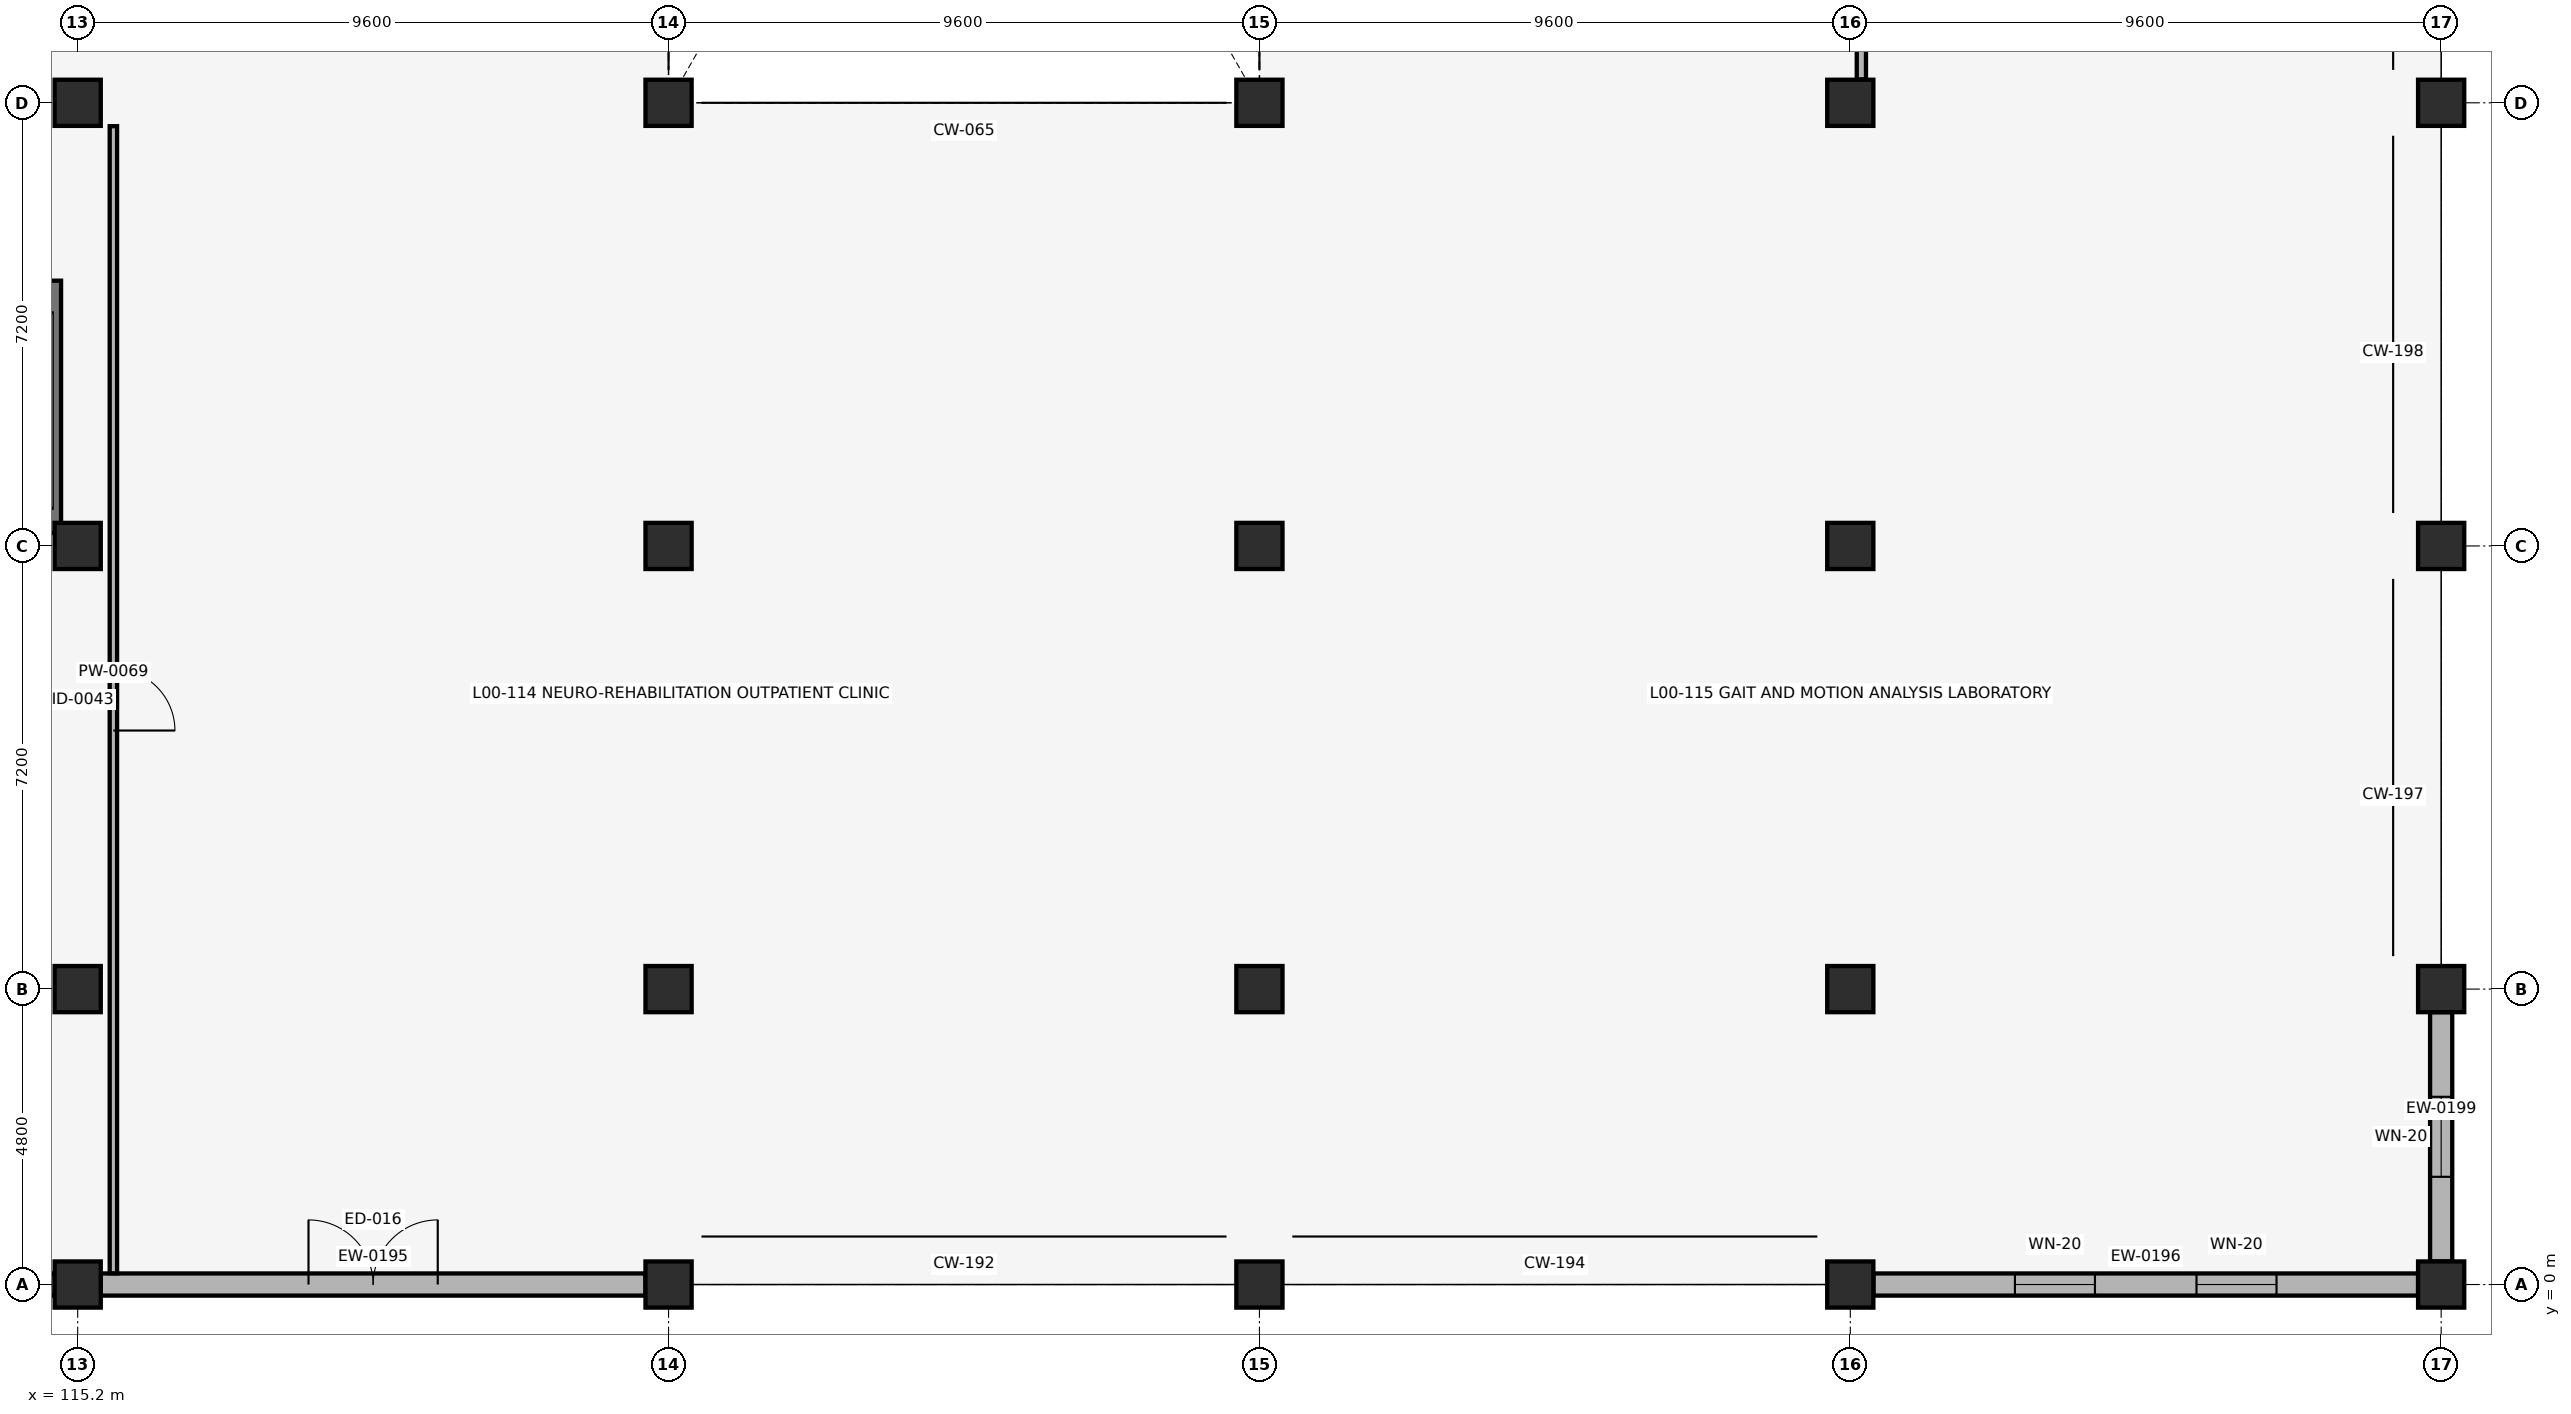
"""IFC4 building model, lengths in metres.
Left out: names, types, materials, properties, quantities, classifications, styles, units other than length and angle.
Written with IfcOpenShell. Run it as: python <this file> out.ifc"""

import sys

from ifc_helpers import new_model, si_unit, direction, frame, frame_2d, origin, origin_2d, place, context, subcontext, project, spatial, rectangle, circle, extrude, element, fill, save


model = new_model("IFC4")
c1 = context("Model", 3, precision=1e-05, world=origin(), true_north=direction((0.0, 1.0)))
c2 = subcontext(c1, "Body", "Model", "MODEL_VIEW")
j1 = project(units=[si_unit("LENGTHUNIT", "METRE"), si_unit("PLANEANGLEUNIT", "RADIAN")], contexts=[c1])
p1 = place(None, origin())
s1 = spatial("IfcSite", under=j1, at=p1, CompositionType="ELEMENT")
p2 = place(p1, origin())
s2 = spatial("IfcBuilding", under=s1, at=p2, CompositionType="ELEMENT")
p3 = place(p2, origin())
s3 = spatial("IfcBuildingStorey", under=s2, at=p3, CompositionType="ELEMENT", Elevation=0.0)
for number, where, z_axis, x_axis in (
    (1, (115.2, 0.0, -0.44), (0.0, 0.0, 1.0), (1.0, 0.0, 0.0)),
    (2, (115.2, 4.8, -0.44), (0.0, 0.0, 1.0), (1.0, 0.0, 0.0)),
    (3, (115.2, 12.0, -0.44), (0.0, 0.0, 1.0), (1.0, 0.0, 0.0)),
    (4, (115.2, 19.2, -0.44), (0.0, 0.0, 1.0), (1.0, 0.0, 0.0)),
    (5, (124.8, 0.0, -0.44), (0.0, 0.0, 1.0), (1.0, 0.0, 0.0)),
    (6, (124.8, 4.8, -0.44), (0.0, 0.0, 1.0), (1.0, 0.0, 0.0)),
    (7, (124.8, 12.0, -0.44), (0.0, 0.0, 1.0), (1.0, 0.0, 0.0)),
    (8, (124.8, 19.2, -0.44), (0.0, 0.0, 1.0), (1.0, 0.0, 0.0)),
    (9, (134.4, 0.0, -0.44), (0.0, 0.0, 1.0), (1.0, 0.0, 0.0)),
    (10, (134.4, 4.8, -0.44), (0.0, 0.0, 1.0), (1.0, 0.0, 0.0)),
    (11, (134.4, 12.0, -0.44), (0.0, 0.0, 1.0), (1.0, 0.0, 0.0)),
    (12, (134.4, 19.2, -0.44), (0.0, 0.0, 1.0), (1.0, 0.0, 0.0)),
    (13, (144.0, 0.0, -0.44), (0.0, 0.0, 1.0), (1.0, 0.0, 0.0)),
    (14, (144.0, 4.8, -0.44), (0.0, 0.0, 1.0), (1.0, 0.0, 0.0)),
    (15, (144.0, 12.0, -0.44), (0.0, 0.0, 1.0), (1.0, 0.0, 0.0)),
    (16, (144.0, 19.2, -0.44), (0.0, 0.0, 1.0), (1.0, 0.0, 0.0)),
    (17, (153.6, 0.0, -0.44), (0.0, 0.0, 1.0), (1.0, 0.0, 0.0)),
    (18, (153.6, 4.8, -0.44), (0.0, 0.0, 1.0), (1.0, 0.0, 0.0)),
    (19, (153.6, 12.0, -0.44), (0.0, 0.0, 1.0), (1.0, 0.0, 0.0)),
    (20, (153.6, 19.2, -0.44), (0.0, 0.0, 1.0), (1.0, 0.0, 0.0)),
):
    element("IfcColumn", number, at=place(p3, frame(where, z_axis=z_axis, x_axis=x_axis)), inside=s3, PredefinedType="COLUMN", context=c2, shape_type="SweptSolid", body=[
        extrude(circle(Radius=0.375, at=origin_2d()), origin(), (0.0, 0.0, 1.0), 4.86),
    ])
p4 = place(p3, frame((105.975, 0.0, 0.0), z_axis=(0.0, 0.0, 1.0), x_axis=(1.0, 0.0, 0.0)))
e21 = element("IfcWall", 21, at=p4, inside=s3, PredefinedType="SOLIDWALL", context=c2, shape_type="SweptSolid", body=[
    extrude(rectangle(XDim=8.85, YDim=0.36, at=frame_2d((4.425, 0.0))), origin(), (0.0, 0.0, 1.0), 3.4),
])
p5 = place(p4, frame((2.3, 0.0, 0.72)))
e22 = element("IfcOpeningElement", 22, at=p5, cuts=e21, PredefinedType="OPENING", context=c2, shape_type="SweptSolid", body=[
    extrude(rectangle(XDim=1.3, YDim=2.32, at=frame_2d((0.65, 1.16))), frame((0.0, 0.19, 0.0), z_axis=(0.0, -1.0, 0.0), x_axis=(1.0, 0.0, 0.0)), (0.0, 0.0, 1.0), 0.38),
])
p6 = place(p4, frame((5.25, 0.0, 0.72)))
e23 = element("IfcOpeningElement", 23, at=p6, cuts=e21, PredefinedType="OPENING", context=c2, shape_type="SweptSolid", body=[
    extrude(rectangle(XDim=1.3, YDim=2.32, at=frame_2d((0.65, 1.16))), frame((0.0, 0.19, 0.0), z_axis=(0.0, -1.0, 0.0), x_axis=(1.0, 0.0, 0.0)), (0.0, 0.0, 1.0), 0.38),
])
p7 = place(p3, frame((115.575, 0.0, 0.0), z_axis=(0.0, 0.0, 1.0), x_axis=(1.0, 0.0, 0.0)))
e24 = element("IfcWall", 24, at=p7, inside=s3, PredefinedType="SOLIDWALL", context=c2, shape_type="SweptSolid", body=[
    extrude(rectangle(XDim=8.85, YDim=0.36, at=frame_2d((4.425, 0.0))), origin(), (0.0, 0.0, 1.0), 3.4),
])
p8 = place(p7, frame((3.375, 0.0, 0.0)))
e25 = element("IfcOpeningElement", 25, at=p8, cuts=e24, PredefinedType="OPENING", context=c2, shape_type="SweptSolid", body=[
    extrude(rectangle(XDim=2.1, YDim=2.3, at=frame_2d((1.05, 1.15))), frame((0.0, 0.19, 0.0), z_axis=(0.0, -1.0, 0.0), x_axis=(1.0, 0.0, 0.0)), (0.0, 0.0, 1.0), 0.38),
])
p9 = place(p3, frame((144.375, 0.0, 0.0), z_axis=(0.0, 0.0, 1.0), x_axis=(1.0, 0.0, 0.0)))
e26 = element("IfcWall", 26, at=p9, inside=s3, PredefinedType="SOLIDWALL", context=c2, shape_type="SweptSolid", body=[
    extrude(rectangle(XDim=8.85, YDim=0.36, at=frame_2d((4.425, 0.0))), origin(), (0.0, 0.0, 1.0), 3.4),
])
p10 = place(p9, frame((2.3, 0.0, 0.72)))
e27 = element("IfcOpeningElement", 27, at=p10, cuts=e26, PredefinedType="OPENING", context=c2, shape_type="SweptSolid", body=[
    extrude(rectangle(XDim=1.3, YDim=2.32, at=frame_2d((0.65, 1.16))), frame((0.0, 0.19, 0.0), z_axis=(0.0, -1.0, 0.0), x_axis=(1.0, 0.0, 0.0)), (0.0, 0.0, 1.0), 0.38),
])
p11 = place(p9, frame((5.25, 0.0, 0.72)))
e28 = element("IfcOpeningElement", 28, at=p11, cuts=e26, PredefinedType="OPENING", context=c2, shape_type="SweptSolid", body=[
    extrude(rectangle(XDim=1.3, YDim=2.32, at=frame_2d((0.65, 1.16))), frame((0.0, 0.19, 0.0), z_axis=(0.0, -1.0, 0.0), x_axis=(1.0, 0.0, 0.0)), (0.0, 0.0, 1.0), 0.38),
])
p12 = place(p3, frame((153.6, 0.375, 0.0), z_axis=(0.0, 0.0, 1.0), x_axis=(0.0, 1.0, 0.0)))
e29 = element("IfcWall", 29, at=p12, inside=s3, PredefinedType="SOLIDWALL", context=c2, shape_type="SweptSolid", body=[
    extrude(rectangle(XDim=4.05, YDim=0.36, at=frame_2d((2.025, 0.0))), origin(), (0.0, 0.0, 1.0), 3.4),
])
p13 = place(p12, frame((1.375, 0.0, 0.72)))
e30 = element("IfcOpeningElement", 30, at=p13, cuts=e29, PredefinedType="OPENING", context=c2, shape_type="SweptSolid", body=[
    extrude(rectangle(XDim=1.3, YDim=2.32, at=frame_2d((0.65, 1.16))), frame((0.0, 0.19, 0.0), z_axis=(0.0, -1.0, 0.0), x_axis=(1.0, 0.0, 0.0)), (0.0, 0.0, 1.0), 0.38),
])
p14 = place(p3, frame((114.78, 12.21, 0.0), z_axis=(0.0, 0.0, 1.0), x_axis=(0.0, 1.0, 0.0)))
e31 = element("IfcWall", 31, at=p14, inside=s3, PredefinedType="SHEAR", context=c2, shape_type="SweptSolid", body=[
    extrude(rectangle(XDim=4.1, YDim=0.3, at=frame_2d((2.05, 0.0))), origin(), (0.0, 0.0, 1.0), 4.12),
])
p15 = place(p3, frame((115.78, 0.182, 0.0), z_axis=(0.0, 0.0, 1.0), x_axis=(0.0, 1.0, 0.0)))
e32 = element("IfcWall", 32, at=p15, inside=s3, PredefinedType="PARTITIONING", context=c2, shape_type="SweptSolid", body=[
    extrude(rectangle(XDim=18.638, YDim=0.12, at=frame_2d((9.319, 0.0))), origin(), (0.0, 0.0, 1.0), 3.4),
])
p16 = place(p15, frame((8.819, 0.0, 0.0)))
e33 = element("IfcOpeningElement", 33, at=p16, cuts=e32, PredefinedType="OPENING", context=c2, shape_type="SweptSolid", body=[
    extrude(rectangle(XDim=1.0, YDim=2.1, at=frame_2d((0.5, 1.05))), frame((0.0, 0.07, 0.0), z_axis=(0.0, -1.0, 0.0), x_axis=(1.0, 0.0, 0.0)), (0.0, 0.0, 1.0), 0.14),
])
p17 = place(p3, frame((144.18, 19.58, 0.0), z_axis=(0.0, 0.0, 1.0), x_axis=(0.0, 1.0, 0.0)))
e34 = element("IfcWall", 34, at=p17, inside=s3, PredefinedType="PARTITIONING", context=c2, shape_type="SweptSolid", body=[
    extrude(rectangle(XDim=6.44, YDim=0.15, at=frame_2d((3.22, 0.0))), origin(), (0.0, 0.0, 1.0), 3.45),
])
p18 = place(p17, frame((2.545, 0.0, 0.0)))
e35 = element("IfcOpeningElement", 35, at=p18, cuts=e34, PredefinedType="OPENING", context=c2, shape_type="SweptSolid", body=[
    extrude(rectangle(XDim=1.35, YDim=2.12, at=frame_2d((0.675, 1.06))), frame((0.0, 0.085, 0.0), z_axis=(0.0, -1.0, 0.0), x_axis=(1.0, 0.0, 0.0)), (0.0, 0.0, 1.0), 0.17),
])
p19 = place(p8, origin())
e36 = element("IfcDoor", 36, at=p19, inside=s3, OperationType="DOUBLE_DOOR_SINGLE_SWING", PredefinedType="DOOR", context=c2, shape_type="SweptSolid", body=[
    extrude(rectangle(XDim=2.1, YDim=2.3, at=frame_2d((1.05, 1.15))), frame((0.0, 0.025, 0.0), z_axis=(0.0, -1.0, 0.0), x_axis=(1.0, 0.0, 0.0)), (0.0, 0.0, 1.0), 0.05),
])
fill(e25, e36)
p20 = place(p10, origin())
e37 = element("IfcWindow", 37, at=p20, inside=s3, PartitioningType="SINGLE_PANEL", PredefinedType="WINDOW", context=c2, shape_type="SweptSolid", body=[
    extrude(rectangle(XDim=1.3, YDim=2.32, at=frame_2d((0.65, 1.16))), frame((0.0, 0.03, 0.0), z_axis=(0.0, -1.0, 0.0), x_axis=(1.0, 0.0, 0.0)), (0.0, 0.0, 1.0), 0.06),
])
fill(e27, e37)
p21 = place(p11, origin())
e38 = element("IfcWindow", 38, at=p21, inside=s3, PartitioningType="SINGLE_PANEL", PredefinedType="WINDOW", context=c2, shape_type="SweptSolid", body=[
    extrude(rectangle(XDim=1.3, YDim=2.32, at=frame_2d((0.65, 1.16))), frame((0.0, 0.03, 0.0), z_axis=(0.0, -1.0, 0.0), x_axis=(1.0, 0.0, 0.0)), (0.0, 0.0, 1.0), 0.06),
])
fill(e28, e38)
p22 = place(p13, origin())
e39 = element("IfcWindow", 39, at=p22, inside=s3, PartitioningType="SINGLE_PANEL", PredefinedType="WINDOW", context=c2, shape_type="SweptSolid", body=[
    extrude(rectangle(XDim=1.3, YDim=2.32, at=frame_2d((0.65, 1.16))), frame((0.0, 0.03, 0.0), z_axis=(0.0, -1.0, 0.0), x_axis=(1.0, 0.0, 0.0)), (0.0, 0.0, 1.0), 0.06),
])
fill(e30, e39)
p23 = place(p16, origin())
e40 = element("IfcDoor", 40, at=p23, inside=s3, OperationType="SINGLE_SWING_RIGHT", PredefinedType="DOOR", context=c2, shape_type="SweptSolid", body=[
    extrude(rectangle(XDim=1.0, YDim=2.1, at=frame_2d((0.5, 1.05))), frame((0.0, 0.025, 0.0), z_axis=(0.0, -1.0, 0.0), x_axis=(1.0, 0.0, 0.0)), (0.0, 0.0, 1.0), 0.05),
])
fill(e33, e40)
save(model, sys.argv[1])
